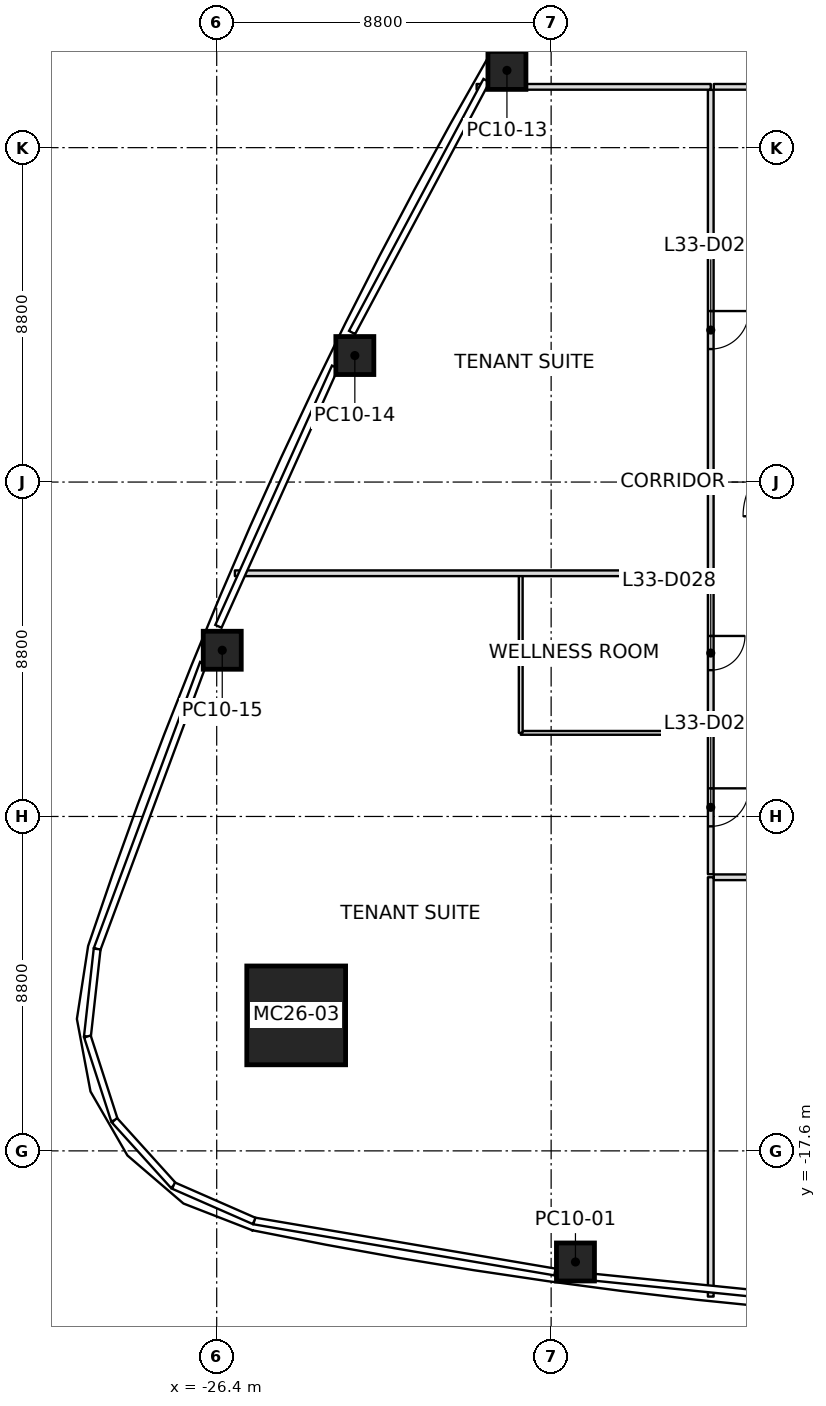
"""IFC4 building model, lengths in metres.
Left out: names, types, materials, properties, quantities, classifications, styles, units other than length and angle.
Written with IfcOpenShell. Run it as: python <this file> out.ifc"""

import sys

from ifc_helpers import new_model, si_unit, direction, frame, frame_2d, origin, origin_2d, place, context, subcontext, project, spatial, rectangle, extrude, element, fill, save


model = new_model("IFC4")
c1 = context("Model", 3, precision=1e-05, world=origin(), true_north=direction((0.0, 1.0)))
c2 = subcontext(c1, "Body", "Model", "MODEL_VIEW")
j1 = project(units=[si_unit("LENGTHUNIT", "METRE"), si_unit("PLANEANGLEUNIT", "RADIAN")], contexts=[c1])
p1 = place(None, origin())
s1 = spatial("IfcSite", under=j1, at=p1, CompositionType="ELEMENT")
p2 = place(p1, origin())
s2 = spatial("IfcBuilding", under=s1, at=p2, CompositionType="ELEMENT")
p3 = place(p2, frame((0.0, 0.0, 153.8)))
s3 = spatial("IfcBuildingStorey", under=s2, at=p3, CompositionType="ELEMENT", Elevation=153.8)
p4 = place(p3, frame((-24.309, -14.034, 0.0), z_axis=(0.028122372328, 0.016226791842, 0.999472772716), x_axis=(0.999604487872, -0.00045651644, -0.02811866672)))
e1 = element("IfcColumn", 1, at=p4, inside=s3, PredefinedType="COLUMN", context=c2, shape_type="SweptSolid", body=[
    extrude(rectangle(XDim=2.6, YDim=2.6, at=origin_2d()), origin(), (0.0, 0.0, 1.0), 4.002),
])
p5 = place(p3, frame((-16.96, -20.524, 0.0), z_axis=(0.017696459735, 0.010434809016, 0.999788952766), x_axis=(-0.990818194268, 0.134234547911, 0.016136668008)))
e2 = element("IfcColumn", 2, at=p5, inside=s3, PredefinedType="COLUMN", context=c2, shape_type="SweptSolid", body=[
    extrude(rectangle(XDim=1.0, YDim=1.0, at=origin_2d()), origin(), (0.0, 0.0, 1.0), 4.001),
])
p6 = place(p3, frame((-18.763, 10.833, 0.0), z_axis=(0.009948074445, -0.005736926367, 0.999934059571), x_axis=(0.499975258342, 0.8660396879, -5.385525e-06)))
e3 = element("IfcColumn", 3, at=p6, inside=s3, PredefinedType="COLUMN", context=c2, shape_type="SweptSolid", body=[
    extrude(rectangle(XDim=1.0, YDim=1.0, at=origin_2d()), origin(), (0.0, 0.0, 1.0), 4.0),
])
p7 = place(p3, frame((-22.765, 3.329, 0.0), z_axis=(0.014097689605, 0.002074984617, 0.999898469639), x_axis=(0.440645983908, 0.897644641837, -0.00807550904)))
e4 = element("IfcColumn", 4, at=p7, inside=s3, PredefinedType="COLUMN", context=c2, shape_type="SweptSolid", body=[
    extrude(rectangle(XDim=1.0, YDim=1.0, at=origin_2d()), origin(), (0.0, 0.0, 1.0), 4.0),
])
p8 = place(p3, frame((-26.254, -4.426, 0.0), z_axis=(0.017879535448, 0.010068680372, 0.999789449778), x_axis=(0.379327691236, 0.925122306117, -0.01610035364)))
e5 = element("IfcColumn", 5, at=p8, inside=s3, PredefinedType="COLUMN", context=c2, shape_type="SweptSolid", body=[
    extrude(rectangle(XDim=1.0, YDim=1.0, at=origin_2d()), origin(), (0.0, 0.0, 1.0), 4.001),
])
p9 = place(p3, frame((-13.4, -2.4, 0.0), z_axis=(0.0, 0.0, 1.0), x_axis=(-1.0, 0.0, 0.0)))
e6 = element("IfcWall", 6, at=p9, inside=s3, PredefinedType="PARTITIONING", context=c2, shape_type="SweptSolid", body=[
    extrude(rectangle(XDim=12.521, YDim=0.15, at=frame_2d((6.261, 0.0))), origin(), (0.0, 0.0, 1.0), 3.234),
])
p10 = place(p3, frame((-13.4, 10.4, 0.0), z_axis=(0.0, 0.0, 1.0), x_axis=(-1.0, 0.0, 0.0)))
e7 = element("IfcWall", 7, at=p10, inside=s3, PredefinedType="PARTITIONING", context=c2, shape_type="SweptSolid", body=[
    extrude(rectangle(XDim=6.16, YDim=0.15, at=frame_2d((3.08, 0.0))), origin(), (0.0, 0.0, 1.0), 3.234),
])
p11 = place(p3, frame((-13.4, -10.4, 0.0), z_axis=(0.0, 0.0, 1.0), x_axis=(0.0, -1.0, 0.0)))
e8 = element("IfcWall", 8, at=p11, inside=s3, PredefinedType="PARTITIONING", context=c2, shape_type="SweptSolid", body=[
    extrude(rectangle(XDim=11.034, YDim=0.15, at=frame_2d((5.517, 0.0))), origin(), (0.0, 0.0, 1.0), 3.234),
])
p12 = place(p3, frame((-13.4, 10.32, 0.0), z_axis=(0.0, 0.0, 1.0), x_axis=(0.0, -1.0, 0.0)))
e9 = element("IfcWall", 9, at=p12, inside=s3, PredefinedType="PARTITIONING", context=c2, shape_type="SweptSolid", body=[
    extrude(rectangle(XDim=20.64, YDim=0.15, at=frame_2d((10.32, 0.0))), origin(), (0.0, 0.0, 1.0), 3.166),
])
p13 = place(p12, frame((5.82, 0.0, 0.0)))
e10 = element("IfcOpeningElement", 10, at=p13, cuts=e9, PredefinedType="OPENING", context=c2, shape_type="SweptSolid", body=[
    extrude(rectangle(XDim=1.0, YDim=2.1, at=frame_2d((0.5, 1.05))), frame((0.0, 0.075, 0.0), z_axis=(0.0, -1.0, 0.0), x_axis=(1.0, 0.0, 0.0)), (0.0, 0.0, 1.0), 0.15),
])
p14 = place(p12, frame((14.37, 0.0, 0.0)))
e11 = element("IfcOpeningElement", 11, at=p14, cuts=e9, PredefinedType="OPENING", context=c2, shape_type="SweptSolid", body=[
    extrude(rectangle(XDim=0.9, YDim=2.1, at=frame_2d((0.45, 1.05))), frame((0.0, 0.075, 0.0), z_axis=(0.0, -1.0, 0.0), x_axis=(1.0, 0.0, 0.0)), (0.0, 0.0, 1.0), 0.15),
])
p15 = place(p12, frame((18.38, 0.0, 0.0)))
e12 = element("IfcOpeningElement", 12, at=p15, cuts=e9, PredefinedType="OPENING", context=c2, shape_type="SweptSolid", body=[
    extrude(rectangle(XDim=1.0, YDim=2.1, at=frame_2d((0.5, 1.05))), frame((0.0, 0.075, 0.0), z_axis=(0.0, -1.0, 0.0), x_axis=(1.0, 0.0, 0.0)), (0.0, 0.0, 1.0), 0.15),
])
p16 = place(p3, frame((-13.32, -10.4, 0.0), z_axis=(0.0, 0.0, 1.0), x_axis=(1.0, 0.0, 0.0)))
e13 = element("IfcWall", 13, at=p16, inside=s3, PredefinedType="PARTITIONING", context=c2, shape_type="SweptSolid", body=[
    extrude(rectangle(XDim=26.64, YDim=0.15, at=frame_2d((13.32, 0.0))), origin(), (0.0, 0.0, 1.0), 3.3),
])
p17 = place(p16, frame((4.82, 0.0, 0.0)))
e14 = element("IfcOpeningElement", 14, at=p17, cuts=e13, PredefinedType="OPENING", context=c2, shape_type="SweptSolid", body=[
    extrude(rectangle(XDim=1.0, YDim=2.1, at=frame_2d((0.5, 1.05))), frame((0.0, 0.075, 0.0), z_axis=(0.0, -1.0, 0.0), x_axis=(1.0, 0.0, 0.0)), (0.0, 0.0, 1.0), 0.15),
])
p18 = place(p16, frame((14.22, 0.0, 0.0)))
e15 = element("IfcOpeningElement", 15, at=p18, cuts=e13, PredefinedType="OPENING", context=c2, shape_type="SweptSolid", body=[
    extrude(rectangle(XDim=1.0, YDim=2.1, at=frame_2d((0.5, 1.05))), frame((0.0, 0.075, 0.0), z_axis=(0.0, -1.0, 0.0), x_axis=(1.0, 0.0, 0.0)), (0.0, 0.0, 1.0), 0.15),
])
p19 = place(p16, frame((22.22, 0.0, 0.0)))
e16 = element("IfcOpeningElement", 16, at=p19, cuts=e13, PredefinedType="OPENING", context=c2, shape_type="SweptSolid", body=[
    extrude(rectangle(XDim=1.0, YDim=2.1, at=frame_2d((0.5, 1.05))), frame((0.0, 0.075, 0.0), z_axis=(0.0, -1.0, 0.0), x_axis=(1.0, 0.0, 0.0)), (0.0, 0.0, 1.0), 0.15),
])
p20 = place(p3, frame((13.32, 10.4, 0.0), z_axis=(0.0, 0.0, 1.0), x_axis=(-1.0, 0.0, 0.0)))
e17 = element("IfcWall", 17, at=p20, inside=s3, PredefinedType="PARTITIONING", context=c2, shape_type="SweptSolid", body=[
    extrude(rectangle(XDim=26.64, YDim=0.15, at=frame_2d((13.32, 0.0))), origin(), (0.0, 0.0, 1.0), 3.097),
])
p21 = place(p20, frame((1.55, 0.0, 0.0)))
e18 = element("IfcOpeningElement", 18, at=p21, cuts=e17, PredefinedType="OPENING", context=c2, shape_type="SweptSolid", body=[
    extrude(rectangle(XDim=0.9, YDim=2.1, at=frame_2d((0.45, 1.05))), frame((0.0, 0.075, 0.0), z_axis=(0.0, -1.0, 0.0), x_axis=(1.0, 0.0, 0.0)), (0.0, 0.0, 1.0), 0.15),
])
p22 = place(p20, frame((6.96, 0.0, 0.0)))
e19 = element("IfcOpeningElement", 19, at=p22, cuts=e17, PredefinedType="OPENING", context=c2, shape_type="SweptSolid", body=[
    extrude(rectangle(XDim=1.0, YDim=2.1, at=frame_2d((0.5, 1.05))), frame((0.0, 0.075, 0.0), z_axis=(0.0, -1.0, 0.0), x_axis=(1.0, 0.0, 0.0)), (0.0, 0.0, 1.0), 0.15),
])
p23 = place(p20, frame((14.22, 0.0, 0.0)))
e20 = element("IfcOpeningElement", 20, at=p23, cuts=e17, PredefinedType="OPENING", context=c2, shape_type="SweptSolid", body=[
    extrude(rectangle(XDim=1.0, YDim=2.1, at=frame_2d((0.5, 1.05))), frame((0.0, 0.075, 0.0), z_axis=(0.0, -1.0, 0.0), x_axis=(1.0, 0.0, 0.0)), (0.0, 0.0, 1.0), 0.15),
])
p24 = place(p20, frame((22.23, 0.0, 0.0)))
e21 = element("IfcOpeningElement", 21, at=p24, cuts=e17, PredefinedType="OPENING", context=c2, shape_type="SweptSolid", body=[
    extrude(rectangle(XDim=1.0, YDim=2.1, at=frame_2d((0.5, 1.05))), frame((0.0, 0.075, 0.0), z_axis=(0.0, -1.0, 0.0), x_axis=(1.0, 0.0, 0.0)), (0.0, 0.0, 1.0), 0.15),
])
p25 = place(p3, frame((-13.43, -6.6, 0.0), z_axis=(0.0, 0.0, 1.0), x_axis=(-1.0, 0.0, 0.0)))
e22 = element("IfcWall", 22, at=p25, inside=s3, PredefinedType="PARTITIONING", context=c2, shape_type="SweptSolid", body=[
    extrude(rectangle(XDim=4.97, YDim=0.1, at=frame_2d((2.485, 0.0))), origin(), (0.0, 0.0, 1.0), 3.247),
])
p26 = place(p3, frame((-18.4, -6.6, 0.0), z_axis=(0.0, 0.0, 1.0), x_axis=(0.0, 1.0, 0.0)))
e23 = element("IfcWall", 23, at=p26, inside=s3, PredefinedType="PARTITIONING", context=c2, shape_type="SweptSolid", body=[
    extrude(rectangle(XDim=4.17, YDim=0.1, at=frame_2d((2.085, 0.0))), origin(), (0.0, 0.0, 1.0), 3.247),
])
p27 = place(p13, origin())
e24 = element("IfcDoor", 24, at=p27, inside=s3, OperationType="SINGLE_SWING_LEFT", PredefinedType="DOOR", context=c2, shape_type="SweptSolid", body=[
    extrude(rectangle(XDim=1.0, YDim=2.1, at=frame_2d((0.5, 1.05))), frame((0.0, 0.025, 0.0), z_axis=(0.0, -1.0, 0.0), x_axis=(1.0, 0.0, 0.0)), (0.0, 0.0, 1.0), 0.05),
])
fill(e10, e24)
p28 = place(p14, origin())
e25 = element("IfcDoor", 25, at=p28, inside=s3, OperationType="SINGLE_SWING_LEFT", PredefinedType="DOOR", context=c2, shape_type="SweptSolid", body=[
    extrude(rectangle(XDim=0.9, YDim=2.1, at=frame_2d((0.45, 1.05))), frame((0.0, 0.025, 0.0), z_axis=(0.0, -1.0, 0.0), x_axis=(1.0, 0.0, 0.0)), (0.0, 0.0, 1.0), 0.05),
])
fill(e11, e25)
p29 = place(p15, origin())
e26 = element("IfcDoor", 26, at=p29, inside=s3, OperationType="SINGLE_SWING_LEFT", PredefinedType="DOOR", context=c2, shape_type="SweptSolid", body=[
    extrude(rectangle(XDim=1.0, YDim=2.1, at=frame_2d((0.5, 1.05))), frame((0.0, 0.025, 0.0), z_axis=(0.0, -1.0, 0.0), x_axis=(1.0, 0.0, 0.0)), (0.0, 0.0, 1.0), 0.05),
])
fill(e12, e26)
save(model, sys.argv[1])
